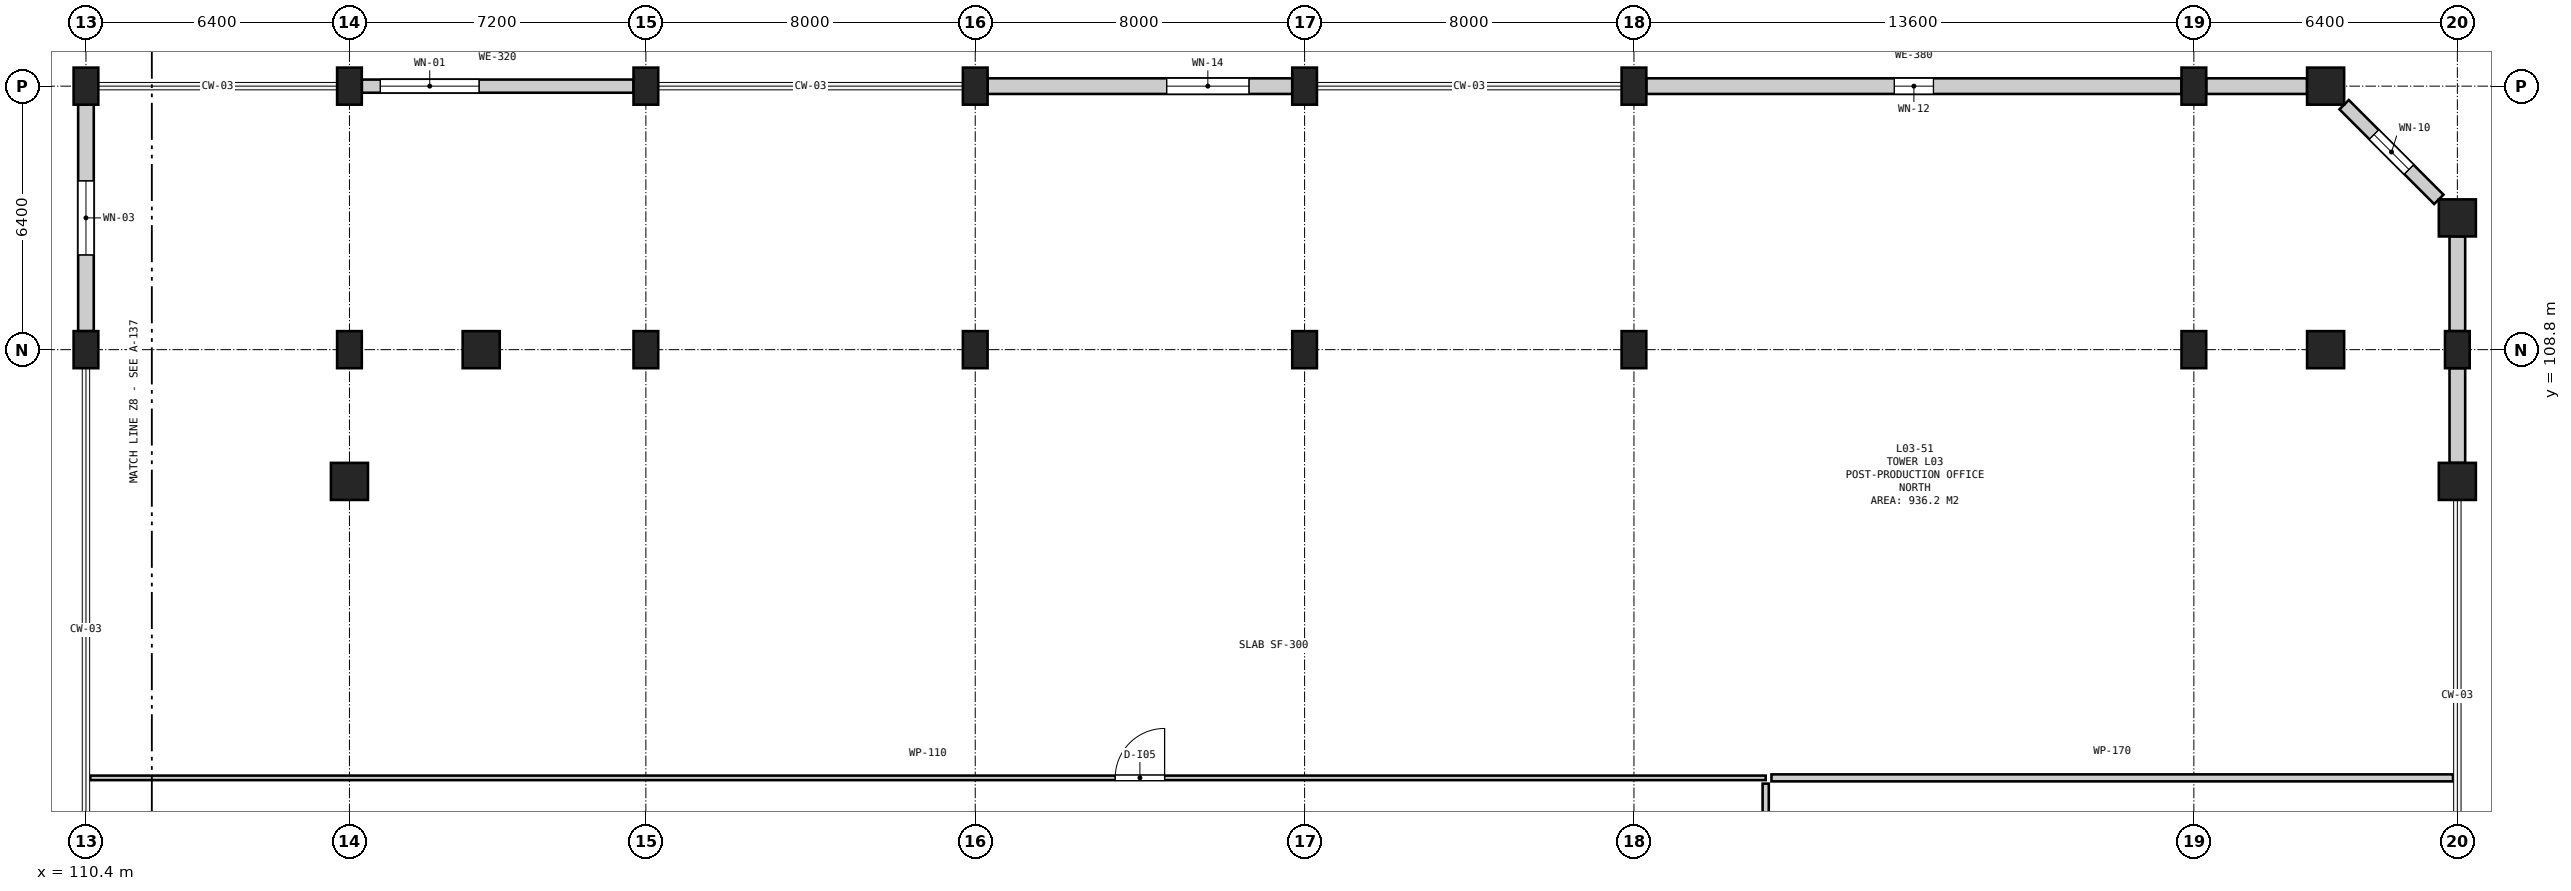
"""IFC4 building model, lengths in metres.
Left out: names, types, materials, properties, quantities, classifications, styles, units other than length and angle.
Written with IfcOpenShell. Run it as: python <this file> out.ifc"""

import sys

from ifc_helpers import new_model, si_unit, direction, frame, frame_2d, origin, origin_2d, place, context, subcontext, project, spatial, rectangle, circle, extrude, element, fill, save


model = new_model("IFC4")
c1 = context("Model", 3, precision=1e-05, world=origin(), true_north=direction((0.0, 1.0)))
c2 = subcontext(c1, "Body", "Model", "MODEL_VIEW")
j1 = project(units=[si_unit("LENGTHUNIT", "METRE"), si_unit("PLANEANGLEUNIT", "RADIAN")], contexts=[c1])
p1 = place(None, origin())
s1 = spatial("IfcSite", under=j1, at=p1, CompositionType="ELEMENT")
p2 = place(p1, origin())
s2 = spatial("IfcBuilding", under=s1, at=p2, CompositionType="ELEMENT")
p3 = place(p2, frame((0.0, 0.0, 15.6)))
s3 = spatial("IfcBuildingStorey", under=s2, at=p3, CompositionType="ELEMENT", Elevation=15.6)
for number, where, z_axis, x_axis in (
    (1, (110.4, 108.8, 0.0), (0.0, 0.0, 1.0), (1.0, 0.0, 0.0)),
    (2, (110.4, 115.2, 0.0), (0.0, 0.0, 1.0), (1.0, 0.0, 0.0)),
):
    element("IfcColumn", number, at=place(p3, frame(where, z_axis=z_axis, x_axis=x_axis)), inside=s3, PredefinedType="COLUMN", context=c2, shape_type="SweptSolid", body=[
        extrude(rectangle(XDim=0.6, YDim=0.9, at=origin_2d()), origin(), (0.0, 0.0, 1.0), 4.2),
    ])
p4 = place(p3, frame((116.8, 105.6, 0.0), z_axis=(0.0, 0.0, 1.0), x_axis=(1.0, 0.0, 0.0)))
e3 = element("IfcColumn", 3, at=p4, inside=s3, PredefinedType="COLUMN", context=c2, shape_type="SweptSolid", body=[
    extrude(circle(Radius=0.45, at=origin_2d()), origin(), (0.0, 0.0, 1.0), 4.2),
])
for number, where, z_axis, x_axis in (
    (4, (116.8, 108.8, 0.0), (0.0, 0.0, 1.0), (1.0, 0.0, 0.0)),
    (5, (116.8, 115.2, 0.0), (0.0, 0.0, 1.0), (1.0, 0.0, 0.0)),
):
    element("IfcColumn", number, at=place(p3, frame(where, z_axis=z_axis, x_axis=x_axis)), inside=s3, PredefinedType="COLUMN", context=c2, shape_type="SweptSolid", body=[
        extrude(rectangle(XDim=0.6, YDim=0.9, at=origin_2d()), origin(), (0.0, 0.0, 1.0), 4.2),
    ])
p5 = place(p3, frame((120.0, 108.8, 0.0), z_axis=(0.0, 0.0, 1.0), x_axis=(1.0, 0.0, 0.0)))
e6 = element("IfcColumn", 6, at=p5, inside=s3, PredefinedType="COLUMN", context=c2, shape_type="SweptSolid", body=[
    extrude(circle(Radius=0.45, at=origin_2d()), origin(), (0.0, 0.0, 1.0), 4.2),
])
for number, where, z_axis, x_axis in (
    (7, (124.0, 108.8, 0.0), (0.0, 0.0, 1.0), (1.0, 0.0, 0.0)),
    (8, (124.0, 115.2, 0.0), (0.0, 0.0, 1.0), (1.0, 0.0, 0.0)),
    (9, (132.0, 108.8, 0.0), (0.0, 0.0, 1.0), (1.0, 0.0, 0.0)),
    (10, (132.0, 115.2, 0.0), (0.0, 0.0, 1.0), (1.0, 0.0, 0.0)),
    (11, (140.0, 108.8, 0.0), (0.0, 0.0, 1.0), (1.0, 0.0, 0.0)),
    (12, (140.0, 115.2, 0.0), (0.0, 0.0, 1.0), (1.0, 0.0, 0.0)),
    (13, (148.0, 108.8, 0.0), (0.0, 0.0, 1.0), (1.0, 0.0, 0.0)),
    (14, (148.0, 115.2, 0.0), (0.0, 0.0, 1.0), (1.0, 0.0, 0.0)),
    (15, (161.6, 108.8, 0.0), (0.0, 0.0, 1.0), (1.0, 0.0, 0.0)),
    (16, (161.6, 115.2, 0.0), (0.0, 0.0, 1.0), (1.0, 0.0, 0.0)),
):
    element("IfcColumn", number, at=place(p3, frame(where, z_axis=z_axis, x_axis=x_axis)), inside=s3, PredefinedType="COLUMN", context=c2, shape_type="SweptSolid", body=[
        extrude(rectangle(XDim=0.6, YDim=0.9, at=origin_2d()), origin(), (0.0, 0.0, 1.0), 4.2),
    ])
for number, where, z_axis, x_axis in (
    (17, (164.8, 108.8, 0.0), (0.0, 0.0, 1.0), (1.0, 0.0, 0.0)),
    (18, (164.8, 115.2, 0.0), (0.0, 0.0, 1.0), (1.0, 0.0, 0.0)),
    (19, (168.0, 105.6, 0.0), (0.0, 0.0, 1.0), (1.0, 0.0, 0.0)),
):
    element("IfcColumn", number, at=place(p3, frame(where, z_axis=z_axis, x_axis=x_axis)), inside=s3, PredefinedType="COLUMN", context=c2, shape_type="SweptSolid", body=[
        extrude(circle(Radius=0.45, at=origin_2d()), origin(), (0.0, 0.0, 1.0), 4.2),
    ])
p6 = place(p3, frame((168.0, 108.8, 0.0), z_axis=(0.0, 0.0, 1.0), x_axis=(1.0, 0.0, 0.0)))
e20 = element("IfcColumn", 20, at=p6, inside=s3, PredefinedType="COLUMN", context=c2, shape_type="SweptSolid", body=[
    extrude(rectangle(XDim=0.6, YDim=0.9, at=origin_2d()), origin(), (0.0, 0.0, 1.0), 4.2),
])
p7 = place(p3, frame((168.0, 112.0, 0.0), z_axis=(0.0, 0.0, 1.0), x_axis=(1.0, 0.0, 0.0)))
e21 = element("IfcColumn", 21, at=p7, inside=s3, PredefinedType="COLUMN", context=c2, shape_type="SweptSolid", body=[
    extrude(circle(Radius=0.45, at=origin_2d()), origin(), (0.0, 0.0, 1.0), 4.2),
])
p8 = place(p3, frame((168.0, 106.05, 0.0), z_axis=(0.0, 0.0, 1.0), x_axis=(0.0, 1.0, 0.0)))
e22 = element("IfcWall", 22, at=p8, inside=s3, PredefinedType="SOLIDWALL", context=c2, shape_type="SweptSolid", body=[
    extrude(rectangle(XDim=2.3, YDim=0.38, at=frame_2d((1.15, 0.0))), origin(), (0.0, 0.0, 1.0), 2.885),
])
p9 = place(p3, frame((168.0, 109.25, 0.0), z_axis=(0.0, 0.0, 1.0), x_axis=(0.0, 1.0, 0.0)))
e23 = element("IfcWall", 23, at=p9, inside=s3, PredefinedType="SOLIDWALL", context=c2, shape_type="SweptSolid", body=[
    extrude(rectangle(XDim=2.3, YDim=0.38, at=frame_2d((1.15, 0.0))), origin(), (0.0, 0.0, 1.0), 3.3),
])
p10 = place(p3, frame((167.55, 112.45, 0.0), z_axis=(0.0, 0.0, 1.0), x_axis=(-0.707106781187, 0.707106781187, 0.0)))
e24 = element("IfcWall", 24, at=p10, inside=s3, PredefinedType="SOLIDWALL", context=c2, shape_type="SweptSolid", body=[
    extrude(rectangle(XDim=3.253, YDim=0.32, at=frame_2d((1.626, 0.0))), origin(), (0.0, 0.0, 1.0), 3.295),
])
p11 = place(p10, frame((1.026, 0.0, 0.9)))
e25 = element("IfcOpeningElement", 25, at=p11, cuts=e24, PredefinedType="OPENING", context=c2, shape_type="SweptSolid", body=[
    extrude(rectangle(XDim=1.2, YDim=1.7, at=frame_2d((0.6, 0.85))), frame((0.0, 0.172, 0.0), z_axis=(0.0, -1.0, 0.0), x_axis=(1.0, 0.0, 0.0)), (0.0, 0.0, 1.0), 0.344),
])
p12 = place(p3, frame((164.35, 115.2, 0.0), z_axis=(0.0, 0.0, 1.0), x_axis=(-1.0, 0.0, 0.0)))
e26 = element("IfcWall", 26, at=p12, inside=s3, PredefinedType="SOLIDWALL", context=c2, shape_type="SweptSolid", body=[
    extrude(rectangle(XDim=2.45, YDim=0.38, at=frame_2d((1.225, 0.0))), origin(), (0.0, 0.0, 1.0), 3.3),
])
p13 = place(p3, frame((161.3, 115.2, 0.0), z_axis=(0.0, 0.0, 1.0), x_axis=(-1.0, 0.0, 0.0)))
e27 = element("IfcWall", 27, at=p13, inside=s3, PredefinedType="SOLIDWALL", context=c2, shape_type="SweptSolid", body=[
    extrude(rectangle(XDim=13.0, YDim=0.38, at=frame_2d((6.5, 0.0))), origin(), (0.0, 0.0, 1.0), 2.835),
])
p14 = place(p13, frame((6.025, 0.0, 0.9)))
e28 = element("IfcOpeningElement", 28, at=p14, cuts=e27, PredefinedType="OPENING", context=c2, shape_type="SweptSolid", body=[
    extrude(rectangle(XDim=0.95, YDim=1.45, at=frame_2d((0.475, 0.725))), frame((0.0, 0.202, 0.0), z_axis=(0.0, -1.0, 0.0), x_axis=(1.0, 0.0, 0.0)), (0.0, 0.0, 1.0), 0.404),
])
p15 = place(p3, frame((139.7, 115.2, 0.0), z_axis=(0.0, 0.0, 1.0), x_axis=(-1.0, 0.0, 0.0)))
e29 = element("IfcWall", 29, at=p15, inside=s3, PredefinedType="SOLIDWALL", context=c2, shape_type="SweptSolid", body=[
    extrude(rectangle(XDim=7.4, YDim=0.38, at=frame_2d((3.7, 0.0))), origin(), (0.0, 0.0, 1.0), 3.3),
])
p16 = place(p15, frame((1.05, 0.0, 0.9)))
e30 = element("IfcOpeningElement", 30, at=p16, cuts=e29, PredefinedType="OPENING", context=c2, shape_type="SweptSolid", body=[
    extrude(rectangle(XDim=2.0, YDim=1.65, at=frame_2d((1.0, 0.825))), frame((0.0, 0.202, 0.0), z_axis=(0.0, -1.0, 0.0), x_axis=(1.0, 0.0, 0.0)), (0.0, 0.0, 1.0), 0.404),
])
p17 = place(p3, frame((123.7, 115.2, 0.0), z_axis=(0.0, 0.0, 1.0), x_axis=(-1.0, 0.0, 0.0)))
e31 = element("IfcWall", 31, at=p17, inside=s3, PredefinedType="SOLIDWALL", context=c2, shape_type="SweptSolid", body=[
    extrude(rectangle(XDim=6.6, YDim=0.32, at=frame_2d((3.3, 0.0))), origin(), (0.0, 0.0, 1.0), 3.3),
])
p18 = place(p17, frame((3.75, 0.0, 0.9)))
e32 = element("IfcOpeningElement", 32, at=p18, cuts=e31, PredefinedType="OPENING", context=c2, shape_type="SweptSolid", body=[
    extrude(rectangle(XDim=2.4, YDim=2.2, at=frame_2d((1.2, 1.1))), frame((0.0, 0.172, 0.0), z_axis=(0.0, -1.0, 0.0), x_axis=(1.0, 0.0, 0.0)), (0.0, 0.0, 1.0), 0.344),
])
p19 = place(p3, frame((110.4, 114.75, 0.0), z_axis=(0.0, 0.0, 1.0), x_axis=(0.0, -1.0, 0.0)))
e33 = element("IfcWall", 33, at=p19, inside=s3, PredefinedType="SOLIDWALL", context=c2, shape_type="SweptSolid", body=[
    extrude(rectangle(XDim=5.5, YDim=0.38, at=frame_2d((2.75, 0.0))), origin(), (0.0, 0.0, 1.0), 3.3),
])
p20 = place(p19, frame((1.85, 0.0, 0.9)))
e34 = element("IfcOpeningElement", 34, at=p20, cuts=e33, PredefinedType="OPENING", context=c2, shape_type="SweptSolid", body=[
    extrude(rectangle(XDim=1.8, YDim=2.1, at=frame_2d((0.9, 1.05))), frame((0.0, 0.202, 0.0), z_axis=(0.0, -1.0, 0.0), x_axis=(1.0, 0.0, 0.0)), (0.0, 0.0, 1.0), 0.404),
])
p21 = place(p3, frame((151.34, 98.4, 0.0), z_axis=(0.0, 0.0, 1.0), x_axis=(1.0, 0.0, 0.0)))
e35 = element("IfcWall", 35, at=p21, inside=s3, PredefinedType="PARTITIONING", context=c2, shape_type="SweptSolid", body=[
    extrude(rectangle(XDim=16.555, YDim=0.17, at=frame_2d((8.277, 0.0))), origin(), (0.0, 0.0, 1.0), 3.9),
])
p22 = place(p3, frame((151.2, 76.14, 0.0), z_axis=(0.0, 0.0, 1.0), x_axis=(0.0, 1.0, 0.0)))
e36 = element("IfcWall", 36, at=p22, inside=s3, PredefinedType="PARTITIONING", context=c2, shape_type="SweptSolid", body=[
    extrude(rectangle(XDim=22.12, YDim=0.15, at=frame_2d((11.06, 0.0))), origin(), (0.0, 0.0, 1.0), 3.9),
])
p23 = place(p22, frame((10.46, 0.0, 0.0)))
e37 = element("IfcOpeningElement", 37, at=p23, cuts=e36, PredefinedType="OPENING", context=c2, shape_type="SweptSolid", body=[
    extrude(rectangle(XDim=1.2, YDim=2.15, at=frame_2d((0.6, 1.075))), frame((0.0, 0.087, 0.0), z_axis=(0.0, -1.0, 0.0), x_axis=(1.0, 0.0, 0.0)), (0.0, 0.0, 1.0), 0.174),
])
p24 = place(p3, frame((110.505, 98.4, 0.0), z_axis=(0.0, 0.0, 1.0), x_axis=(1.0, 0.0, 0.0)))
e38 = element("IfcWall", 38, at=p24, inside=s3, PredefinedType="PARTITIONING", context=c2, shape_type="SweptSolid", body=[
    extrude(rectangle(XDim=40.695, YDim=0.11, at=frame_2d((20.348, 0.0))), origin(), (0.0, 0.0, 1.0), 3.9),
])
p25 = place(p24, frame((24.895, 0.0, 0.0)))
e39 = element("IfcOpeningElement", 39, at=p25, cuts=e38, PredefinedType="OPENING", context=c2, shape_type="SweptSolid", body=[
    extrude(rectangle(XDim=1.2, YDim=2.15, at=frame_2d((0.6, 1.075))), frame((0.0, 0.067, 0.0), z_axis=(0.0, -1.0, 0.0), x_axis=(1.0, 0.0, 0.0)), (0.0, 0.0, 1.0), 0.134),
])
p26 = place(p11, origin())
e40 = element("IfcWindow", 40, at=p26, inside=s3, PartitioningType="SINGLE_PANEL", PredefinedType="WINDOW", context=c2, shape_type="SweptSolid", body=[
    extrude(rectangle(XDim=1.2, YDim=1.7, at=frame_2d((0.6, 0.85))), frame((0.0, 0.03, 0.0), z_axis=(0.0, -1.0, 0.0), x_axis=(1.0, 0.0, 0.0)), (0.0, 0.0, 1.0), 0.06),
])
fill(e25, e40)
p27 = place(p14, origin())
e41 = element("IfcWindow", 41, at=p27, inside=s3, PartitioningType="SINGLE_PANEL", PredefinedType="WINDOW", context=c2, shape_type="SweptSolid", body=[
    extrude(rectangle(XDim=0.95, YDim=1.45, at=frame_2d((0.475, 0.725))), frame((0.0, 0.03, 0.0), z_axis=(0.0, -1.0, 0.0), x_axis=(1.0, 0.0, 0.0)), (0.0, 0.0, 1.0), 0.06),
])
fill(e28, e41)
p28 = place(p16, origin())
e42 = element("IfcWindow", 42, at=p28, inside=s3, PartitioningType="DOUBLE_PANEL_HORIZONTAL", PredefinedType="WINDOW", context=c2, shape_type="SweptSolid", body=[
    extrude(rectangle(XDim=2.0, YDim=1.65, at=frame_2d((1.0, 0.825))), frame((0.0, 0.03, 0.0), z_axis=(0.0, -1.0, 0.0), x_axis=(1.0, 0.0, 0.0)), (0.0, 0.0, 1.0), 0.06),
])
fill(e30, e42)
p29 = place(p18, origin())
e43 = element("IfcWindow", 43, at=p29, inside=s3, PartitioningType="DOUBLE_PANEL_VERTICAL", PredefinedType="WINDOW", context=c2, shape_type="SweptSolid", body=[
    extrude(rectangle(XDim=2.4, YDim=2.2, at=frame_2d((1.2, 1.1))), frame((0.0, 0.03, 0.0), z_axis=(0.0, -1.0, 0.0), x_axis=(1.0, 0.0, 0.0)), (0.0, 0.0, 1.0), 0.06),
])
fill(e32, e43)
p30 = place(p20, origin())
e44 = element("IfcWindow", 44, at=p30, inside=s3, PartitioningType="DOUBLE_PANEL_VERTICAL", PredefinedType="WINDOW", context=c2, shape_type="SweptSolid", body=[
    extrude(rectangle(XDim=1.8, YDim=2.1, at=frame_2d((0.9, 1.05))), frame((0.0, 0.03, 0.0), z_axis=(0.0, -1.0, 0.0), x_axis=(1.0, 0.0, 0.0)), (0.0, 0.0, 1.0), 0.06),
])
fill(e34, e44)
p31 = place(p25, origin())
e45 = element("IfcDoor", 45, at=p31, inside=s3, OperationType="SINGLE_SWING_RIGHT", PredefinedType="DOOR", context=c2, shape_type="SweptSolid", body=[
    extrude(rectangle(XDim=1.2, YDim=2.15, at=frame_2d((0.6, 1.075))), frame((0.0, 0.025, 0.0), z_axis=(0.0, -1.0, 0.0), x_axis=(1.0, 0.0, 0.0)), (0.0, 0.0, 1.0), 0.05),
])
fill(e39, e45)
save(model, sys.argv[1])
